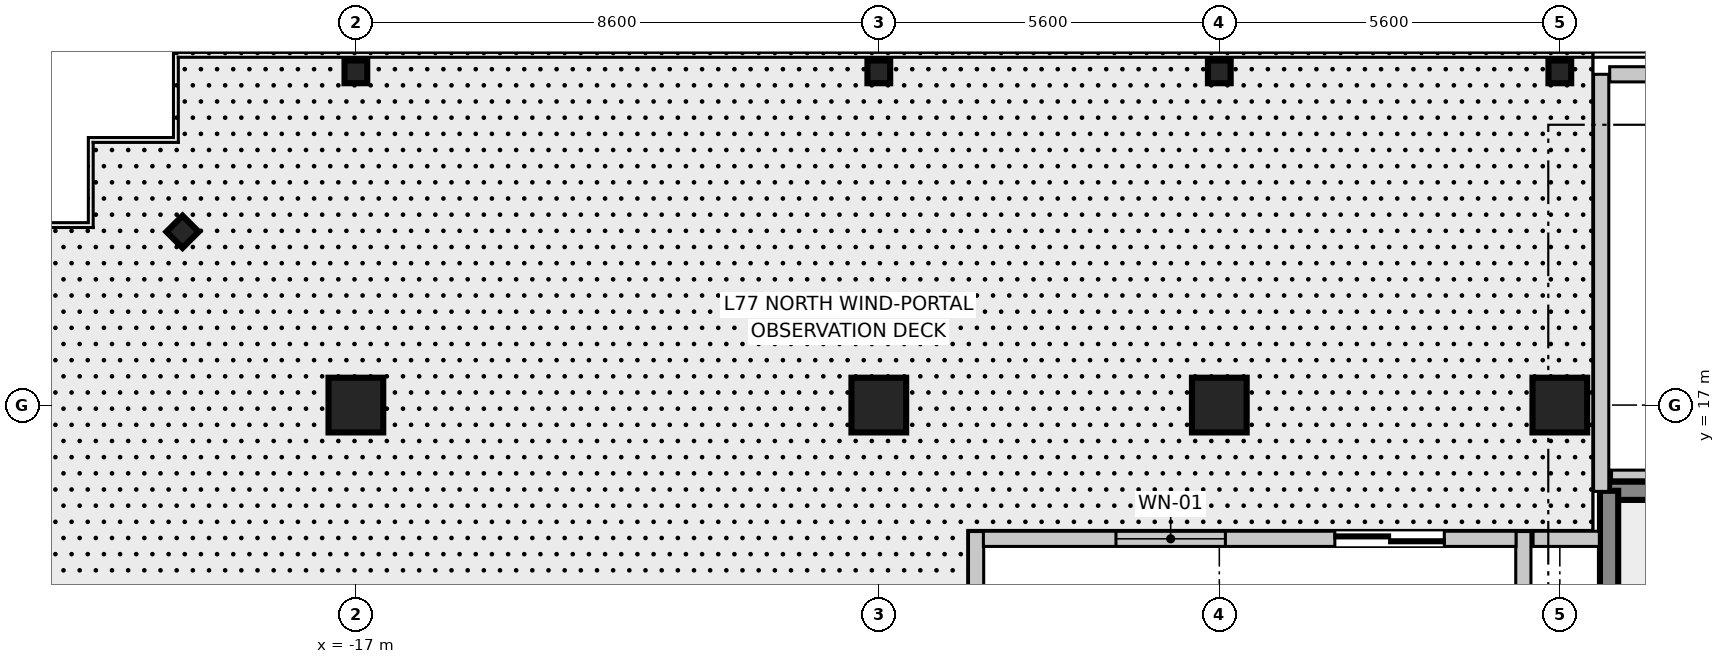
"""IFC4 building model, lengths in metres.
Left out: names, types, materials, properties, quantities, classifications, styles, units other than length and angle.
Written with IfcOpenShell. Run it as: python <this file> out.ifc"""

import sys

from ifc_helpers import new_model, si_unit, direction, frame, frame_2d, origin, origin_2d, place, context, subcontext, project, spatial, rectangle, i_section, extrude, source, transform, mapped, element, fill, save


model = new_model("IFC4")
c1 = context("Model", 3, precision=1e-05, world=origin(), true_north=direction((0.0, 1.0)))
c2 = subcontext(c1, "Body", "Model", "MODEL_VIEW")
j1 = project(units=[si_unit("LENGTHUNIT", "METRE"), si_unit("PLANEANGLEUNIT", "RADIAN")], contexts=[c1])
p1 = place(None, origin())
s1 = spatial("IfcSite", under=j1, at=p1, CompositionType="ELEMENT")
p2 = place(p1, origin())
s2 = spatial("IfcBuilding", under=s1, at=p2, CompositionType="ELEMENT")
p3 = place(p2, frame((0.0, 0.0, 300.35)))
s3 = spatial("IfcBuildingStorey", under=s2, at=p3, CompositionType="ELEMENT", Elevation=300.35)
m1 = source(origin(), c2, "Body", "SweptSolid", [
    extrude(rectangle(XDim=0.9, YDim=0.9, at=origin_2d()), origin(), (0.0, 0.0, 1.0), 3.805),
])
for number, where, z_axis, x_axis in (
    (1, (-17.0, 17.0, 0.0), (0.0, 0.0, 1.0), (1.0, 0.0, 0.0)),
    (2, (-8.4, 17.0, 0.0), (0.0, 0.0, 1.0), (1.0, 0.0, 0.0)),
    (3, (-2.8, 17.0, 0.0), (0.0, 0.0, 1.0), (1.0, 0.0, 0.0)),
    (4, (2.8, 17.0, 0.0), (0.0, 0.0, 1.0), (1.0, 0.0, 0.0)),
):
    element("IfcColumn", number, at=place(p3, frame(where, z_axis=z_axis, x_axis=x_axis)), inside=s3, PredefinedType="COLUMN", context=c2, shape_type="MappedRepresentation", body=[
        mapped(m1, transform((0.0, 0.0, 0.0), scale=1.0)),
    ])
m2 = source(origin(), c2, "Body", "SweptSolid", [
    extrude(i_section(OverallWidth=0.374, OverallDepth=0.374, WebThickness=0.014, FlangeThickness=0.023, at=origin_2d()), origin(), (0.0, 0.0, 1.0), 3.805),
])
for number, where, z_axis, x_axis in (
    (5, (-17.0, 22.48, 0.0), (0.0, 0.0, 1.0), (0.0, 1.0, 0.0)),
    (6, (-8.4, 22.48, 0.0), (0.0, 0.0, 1.0), (0.0, 1.0, 0.0)),
    (7, (-2.8, 22.48, 0.0), (0.0, 0.0, 1.0), (0.0, 1.0, 0.0)),
    (8, (2.8, 22.48, 0.0), (0.0, 0.0, 1.0), (0.0, 1.0, 0.0)),
    (9, (-19.85, 19.85, 0.0), (0.0, 0.0, 1.0), (0.707, 0.707, 0.0)),
):
    element("IfcColumn", number, at=place(p3, frame(where, z_axis=z_axis, x_axis=x_axis)), inside=s3, PredefinedType="COLUMN", context=c2, shape_type="MappedRepresentation", body=[
        mapped(m2, transform((0.0, 0.0, 0.0), scale=1.0)),
    ])
m3 = source(origin(), c2, "Body", "SweptSolid", [
    extrude(rectangle(XDim=3.98, YDim=0.3, at=frame_2d((1.99, 0.0))), origin(), (0.0, 0.0, 1.0), 3.55),
])
p4 = place(p3, frame((3.61, 15.59, 0.0), z_axis=(0.0, 0.0, 1.0), x_axis=(1.0, 0.0, 0.0)))
e10 = element("IfcWall", 10, at=p4, inside=s3, PredefinedType="SHEAR", context=c2, shape_type="MappedRepresentation", body=[
    mapped(m3, transform((0.0, 0.0, 0.0), scale=1.0)),
])
m4 = source(origin(), c2, "Body", "SweptSolid", [
    extrude(rectangle(XDim=9.38, YDim=0.3, at=frame_2d((4.69, 0.0))), origin(), (0.0, 0.0, 1.0), 3.55),
])
p5 = place(p3, frame((3.61, 6.21, 0.0), z_axis=(0.0, 0.0, 1.0), x_axis=(0.0, 1.0, 0.0)))
e11 = element("IfcWall", 11, at=p5, inside=s3, PredefinedType="SHEAR", context=c2, shape_type="MappedRepresentation", body=[
    mapped(m4, transform((0.0, 0.0, 0.0), scale=1.0)),
])
m5 = source(origin(), c2, "Body", "SweptSolid", [
    extrude(rectangle(XDim=8.84, YDim=0.25, at=frame_2d((4.42, 0.0))), origin(), (0.0, 0.0, 1.0), 2.99),
])
for number, where, z_axis, x_axis in (
    (12, (-6.8, 6.08, 0.0), (0.0, 0.0, 1.0), (0.0, 1.0, 0.0)),
    (13, (2.2, 6.08, 0.0), (0.0, 0.0, 1.0), (0.0, 1.0, 0.0)),
):
    element("IfcWall", number, at=place(p3, frame(where, z_axis=z_axis, x_axis=x_axis)), inside=s3, PredefinedType="STANDARD", context=c2, shape_type="MappedRepresentation", body=[
        mapped(m5, transform((0.0, 0.0, 0.0), scale=1.0)),
    ])
m6 = source(origin(), c2, "Body", "SweptSolid", [
    extrude(rectangle(XDim=8.76, YDim=0.25, at=frame_2d((4.38, 0.0))), origin(), (0.0, 0.0, 1.0), 2.99),
])
p6 = place(p3, frame((-6.68, 14.8, 0.0), z_axis=(0.0, 0.0, 1.0), x_axis=(1.0, 0.0, 0.0)))
e14 = element("IfcWall", 14, at=p6, inside=s3, PredefinedType="STANDARD", context=c2, shape_type="MappedRepresentation", body=[
    mapped(m6, transform((0.0, 0.0, 0.0), scale=1.0)),
])
p7 = place(p6, frame((5.78, 0.0, 0.0)))
e15 = element("IfcOpeningElement", 15, at=p7, cuts=e14, PredefinedType="OPENING", context=c2, shape_type="SweptSolid", body=[
    extrude(rectangle(XDim=1.8, YDim=2.25, at=frame_2d((0.9, 1.125))), frame((0.0, 0.135, 0.0), z_axis=(0.0, -1.0, 0.0), x_axis=(1.0, 0.0, 0.0)), (0.0, 0.0, 1.0), 0.27),
])
p8 = place(p6, frame((2.18, 0.0, 0.85)))
e16 = element("IfcOpeningElement", 16, at=p8, cuts=e14, PredefinedType="OPENING", context=c2, shape_type="SweptSolid", body=[
    extrude(rectangle(XDim=1.8, YDim=1.5, at=frame_2d((0.9, 0.75))), frame((0.0, 0.135, 0.0), z_axis=(0.0, -1.0, 0.0), x_axis=(1.0, 0.0, 0.0)), (0.0, 0.0, 1.0), 0.27),
])
m7 = source(origin(), c2, "Body", "SweptSolid", [
    extrude(rectangle(XDim=1.09, YDim=0.25, at=frame_2d((0.545, 0.0))), origin(), (0.0, 0.0, 1.0), 2.89),
])
p9 = place(p3, frame((2.36, 14.8, 0.0), z_axis=(0.0, 0.0, 1.0), x_axis=(1.0, 0.0, 0.0)))
e17 = element("IfcWall", 17, at=p9, inside=s3, PredefinedType="STANDARD", context=c2, shape_type="MappedRepresentation", body=[
    mapped(m7, transform((0.0, 0.0, 0.0), scale=1.0)),
])
m8 = source(origin(), c2, "Body", "SweptSolid", [
    extrude(rectangle(XDim=6.86, YDim=0.25, at=frame_2d((3.43, 0.0))), origin(), (0.0, 0.0, 1.0), 2.89),
])
p10 = place(p3, frame((3.48, 15.58, 0.0), z_axis=(0.0, 0.0, 1.0), x_axis=(0.0, 1.0, 0.0)))
e18 = element("IfcWall", 18, at=p10, inside=s3, PredefinedType="STANDARD", context=c2, shape_type="MappedRepresentation", body=[
    mapped(m8, transform((0.0, 0.0, 0.0), scale=1.0)),
])
m9 = source(origin(), c2, "Body", "SweptSolid", [
    extrude(rectangle(XDim=16.0, YDim=0.25, at=frame_2d((8.0, 0.0))), origin(), (0.0, 0.0, 1.0), 2.89),
])
p11 = place(p3, frame((3.62, 22.44, 0.0), z_axis=(0.0, 0.0, 1.0), x_axis=(1.0, 0.0, 0.0)))
e19 = element("IfcWall", 19, at=p11, inside=s3, PredefinedType="STANDARD", context=c2, shape_type="MappedRepresentation", body=[
    mapped(m9, transform((0.0, 0.0, 0.0), scale=1.0)),
])
m10 = source(origin(), c2, "Body", "SweptSolid", [
    extrude(rectangle(XDim=5.47, YDim=0.16, at=frame_2d((2.735, 0.0))), origin(), (0.0, 0.0, 1.0), 2.89),
])
p12 = place(p3, frame((3.65, 15.85, 0.0), z_axis=(0.0, 0.0, 1.0), x_axis=(1.0, 0.0, 0.0)))
e20 = element("IfcWall", 20, at=p12, inside=s3, PredefinedType="PARTITIONING", context=c2, shape_type="MappedRepresentation", body=[
    mapped(m10, transform((0.0, 0.0, 0.0), scale=1.0)),
])
m11 = source(origin(), c2, "Body", "SweptSolid", [
    extrude(rectangle(XDim=1.8, YDim=2.25, at=frame_2d((0.9, 1.125))), frame((0.0, 0.025, 0.0), z_axis=(0.0, -1.0, 0.0), x_axis=(1.0, 0.0, 0.0)), (0.0, 0.0, 1.0), 0.05),
])
p13 = place(p7, origin())
e21 = element("IfcDoor", 21, at=p13, inside=s3, OperationType="DOUBLE_DOOR_SLIDING", PredefinedType="DOOR", context=c2, shape_type="MappedRepresentation", body=[
    mapped(m11, transform((0.0, 0.0, 0.0), scale=1.0)),
])
fill(e15, e21)
m12 = source(origin(), c2, "Body", "SweptSolid", [
    extrude(rectangle(XDim=1.8, YDim=1.5, at=frame_2d((0.9, 0.75))), frame((0.0, 0.03, 0.0), z_axis=(0.0, -1.0, 0.0), x_axis=(1.0, 0.0, 0.0)), (0.0, 0.0, 1.0), 0.06),
])
p14 = place(p8, origin())
e22 = element("IfcWindow", 22, at=p14, inside=s3, PartitioningType="SINGLE_PANEL", PredefinedType="WINDOW", context=c2, shape_type="MappedRepresentation", body=[
    mapped(m12, transform((0.0, 0.0, 0.0), scale=1.0)),
])
fill(e16, e22)
save(model, sys.argv[1])
